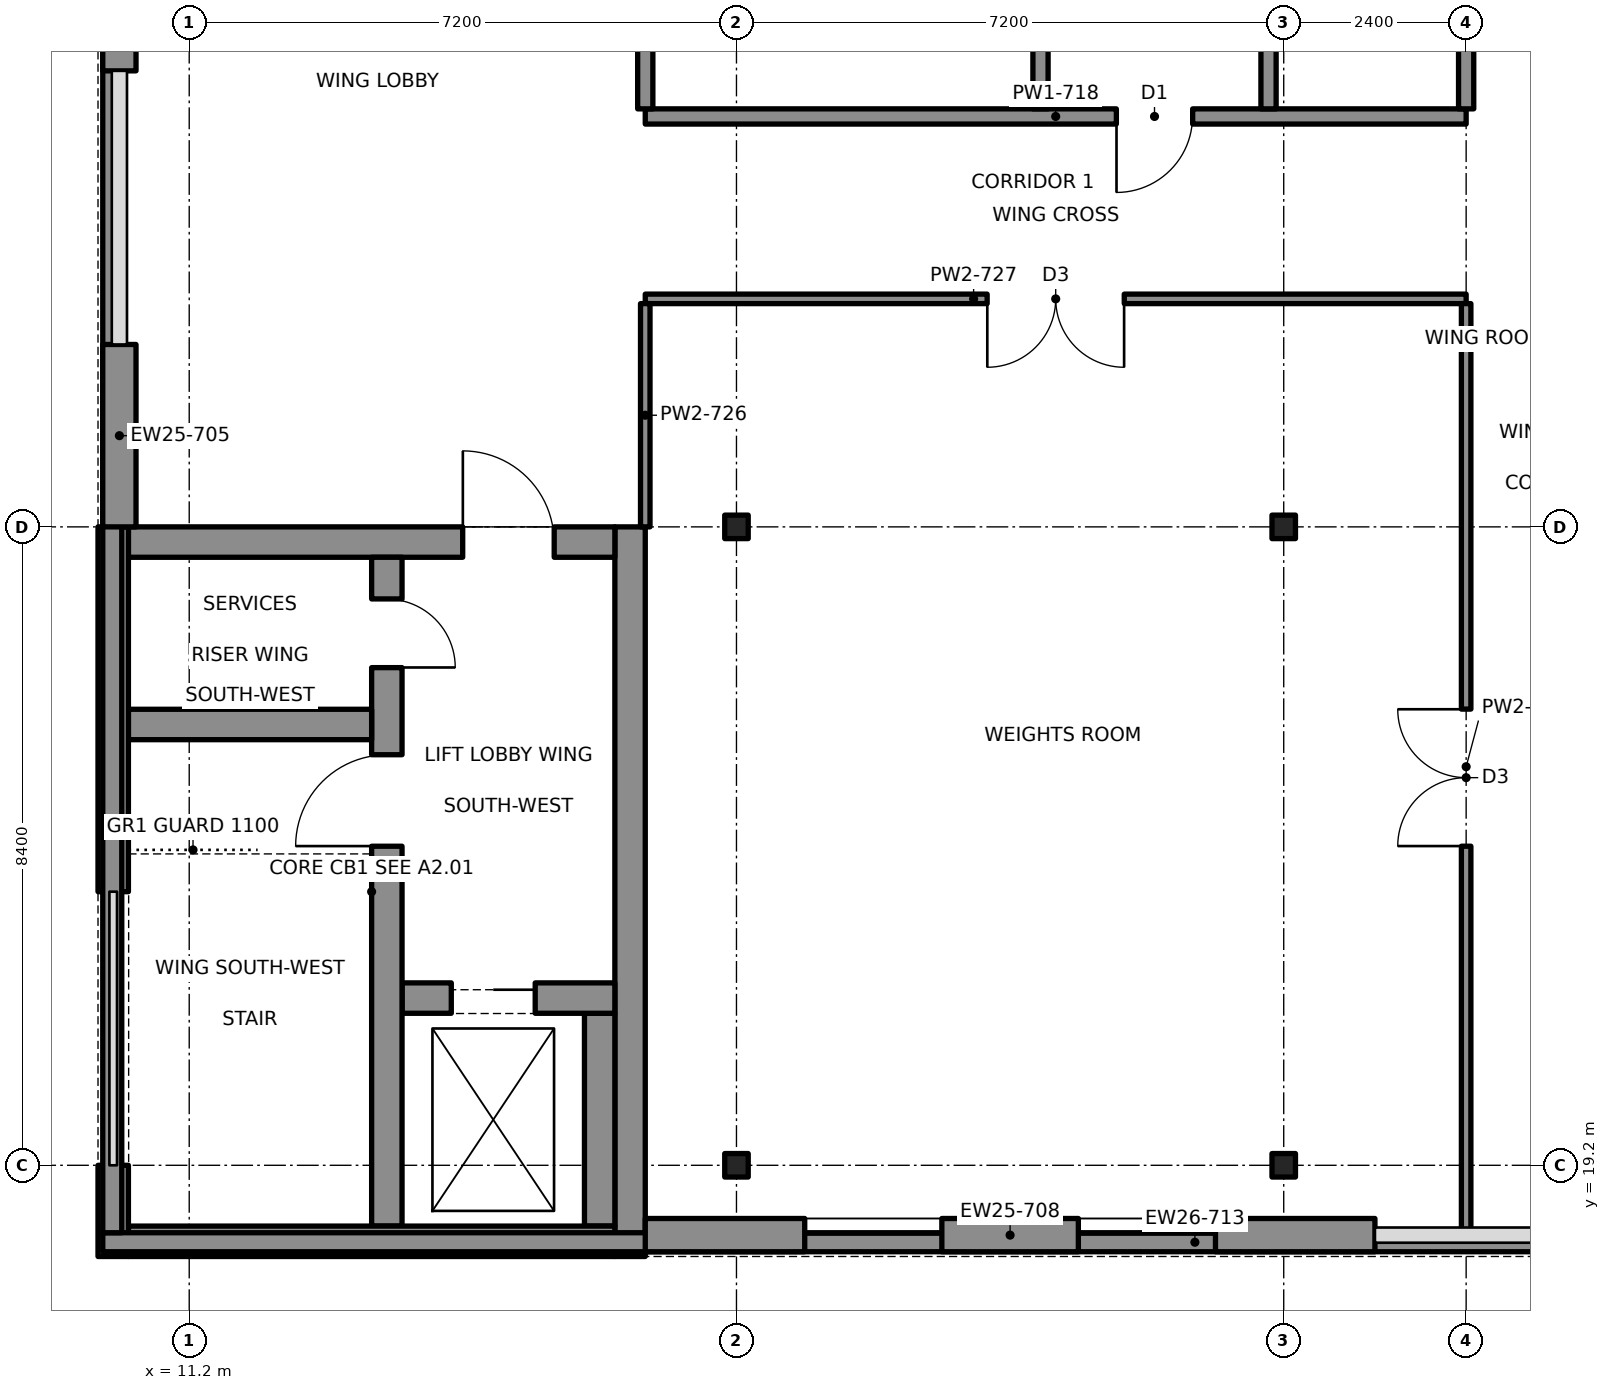
"""IFC4 building model, lengths in metres.
Left out: names, types, materials, properties, quantities, classifications, styles, units other than length and angle.
Written with IfcOpenShell. Run it as: python <this file> out.ifc"""

import sys

from ifc_helpers import new_model, si_unit, direction, frame, frame_2d, origin, origin_2d, place, context, subcontext, project, spatial, rectangle, i_section, extrude, element, fill, save


model = new_model("IFC4")
c1 = context("Model", 3, precision=1e-05, world=origin(), true_north=direction((0.0, 1.0)))
c2 = subcontext(c1, "Body", "Model", "MODEL_VIEW")
j1 = project(units=[si_unit("LENGTHUNIT", "METRE"), si_unit("PLANEANGLEUNIT", "RADIAN")], contexts=[c1])
p1 = place(None, origin())
s1 = spatial("IfcSite", under=j1, at=p1, CompositionType="ELEMENT")
p2 = place(p1, origin())
s2 = spatial("IfcBuilding", under=s1, at=p2, CompositionType="ELEMENT")
p3 = place(p2, frame((0.0, 0.0, 14.0)))
s3 = spatial("IfcBuildingStorey", under=s2, at=p3, CompositionType="ELEMENT", Elevation=14.0)
for number, where, z_axis, x_axis in (
    (1, (18.4, 19.2, 0.0), (0.0, 0.0, 1.0), (1.0, 0.0, 0.0)),
    (2, (18.4, 27.6, 0.0), (0.0, 0.0, 1.0), (1.0, 0.0, 0.0)),
    (3, (25.6, 19.2, 0.0), (0.0, 0.0, 1.0), (1.0, 0.0, 0.0)),
    (4, (25.6, 27.6, 0.0), (0.0, 0.0, 1.0), (1.0, 0.0, 0.0)),
):
    element("IfcColumn", number, at=place(p3, frame(where, z_axis=z_axis, x_axis=x_axis)), inside=s3, PredefinedType="COLUMN", context=c2, shape_type="SweptSolid", body=[
        extrude(i_section(OverallWidth=0.309, OverallDepth=0.323, WebThickness=0.014, FlangeThickness=0.023, at=origin_2d()), origin(), (0.0, 0.0, 1.0), 4.4),
    ])
p4 = place(p3, frame((17.2, 18.281, 0.0), z_axis=(0.0, 0.0, 1.0), x_axis=(1.0, 0.0, 0.0)))
e5 = element("IfcWall", 5, at=p4, inside=s3, PredefinedType="SOLIDWALL", context=c2, shape_type="SweptSolid", body=[
    extrude(rectangle(XDim=9.6, YDim=0.438, at=frame_2d((4.8, 0.0))), origin(), (0.0, 0.0, 1.0), 4.4),
])
p5 = place(p4, frame((2.1, 0.0, 0.75)))
e6 = element("IfcOpeningElement", 6, at=p5, cuts=e5, PredefinedType="OPENING", context=c2, shape_type="SweptSolid", body=[
    extrude(rectangle(XDim=1.8, YDim=2.8, at=frame_2d((0.9, 1.4))), frame((0.0, 0.229, 0.0), z_axis=(0.0, -1.0, 0.0), x_axis=(1.0, 0.0, 0.0)), (0.0, 0.0, 1.0), 0.458),
])
p6 = place(p4, frame((5.7, 0.0, 0.75)))
e7 = element("IfcOpeningElement", 7, at=p6, cuts=e5, PredefinedType="OPENING", context=c2, shape_type="SweptSolid", body=[
    extrude(rectangle(XDim=1.8, YDim=2.8, at=frame_2d((0.9, 1.4))), frame((0.0, 0.229, 0.0), z_axis=(0.0, -1.0, 0.0), x_axis=(1.0, 0.0, 0.0)), (0.0, 0.0, 1.0), 0.458),
])
p7 = place(p3, frame((10.281, 27.6, 0.0), z_axis=(0.0, 0.0, 1.0), x_axis=(0.0, 1.0, 0.0)))
e8 = element("IfcWall", 8, at=p7, inside=s3, PredefinedType="SOLIDWALL", context=c2, shape_type="SweptSolid", body=[
    extrude(rectangle(XDim=2.4, YDim=0.438, at=frame_2d((1.2, 0.0))), origin(), (0.0, 0.0, 1.0), 4.4),
])
p8 = place(p3, frame((10.281, 33.6, 0.0), z_axis=(0.0, 0.0, 1.0), x_axis=(0.0, 1.0, 0.0)))
e9 = element("IfcWall", 9, at=p8, inside=s3, PredefinedType="SOLIDWALL", context=c2, shape_type="SweptSolid", body=[
    extrude(rectangle(XDim=4.8, YDim=0.438, at=frame_2d((2.4, 0.0))), origin(), (0.0, 0.0, 1.0), 4.4),
])
p9 = place(p3, frame((10.062, 18.188, 4.4), z_axis=(0.0, 0.0, 1.0), x_axis=(1.0, 0.0, 0.0)))
e10 = element("IfcWall", 10, at=p9, inside=s3, PredefinedType="PARAPET", context=c2, shape_type="SweptSolid", body=[
    extrude(rectangle(XDim=28.738, YDim=0.25, at=frame_2d((14.369, 0.0))), origin(), (0.0, 0.0, 1.0), 1.1),
])
p10 = place(p3, frame((10.188, 18.312, 4.4), z_axis=(0.0, 0.0, 1.0), x_axis=(0.0, 1.0, 0.0)))
e11 = element("IfcWall", 11, at=p10, inside=s3, PredefinedType="PARAPET", context=c2, shape_type="SweptSolid", body=[
    extrude(rectangle(XDim=35.375, YDim=0.25, at=frame_2d((17.688, 0.0))), origin(), (0.0, 0.0, 1.0), 1.1),
])
p11 = place(p3, frame((10.2, 18.0, 0.0), z_axis=(0.0, 0.0, 1.0), x_axis=(0.0, 1.0, 0.0)))
e12 = element("IfcWall", 12, at=p11, inside=s3, PredefinedType="SHEAR", context=c2, shape_type="SweptSolid", body=[
    extrude(rectangle(XDim=1.2, YDim=0.4, at=frame_2d((0.6, 0.0))), origin(), (0.0, 0.0, 1.0), 4.2),
])
p12 = place(p3, frame((10.2, 22.8, 0.0), z_axis=(0.0, 0.0, 1.0), x_axis=(0.0, 1.0, 0.0)))
e13 = element("IfcWall", 13, at=p12, inside=s3, PredefinedType="SHEAR", context=c2, shape_type="SweptSolid", body=[
    extrude(rectangle(XDim=4.8, YDim=0.4, at=frame_2d((2.4, 0.0))), origin(), (0.0, 0.0, 1.0), 4.2),
])
p13 = place(p3, frame((17.0, 18.0, 0.0), z_axis=(0.0, 0.0, 1.0), x_axis=(0.0, 1.0, 0.0)))
e14 = element("IfcWall", 14, at=p13, inside=s3, PredefinedType="SHEAR", context=c2, shape_type="SweptSolid", body=[
    extrude(rectangle(XDim=9.6, YDim=0.4, at=frame_2d((4.8, 0.0))), origin(), (0.0, 0.0, 1.0), 4.2),
])
p14 = place(p3, frame((10.4, 18.2, 0.0), z_axis=(0.0, 0.0, 1.0), x_axis=(1.0, 0.0, 0.0)))
e15 = element("IfcWall", 15, at=p14, inside=s3, PredefinedType="SHEAR", context=c2, shape_type="SweptSolid", body=[
    extrude(rectangle(XDim=6.4, YDim=0.4, at=frame_2d((3.2, 0.0))), origin(), (0.0, 0.0, 1.0), 4.2),
])
p15 = place(p3, frame((10.4, 27.4, 0.0), z_axis=(0.0, 0.0, 1.0), x_axis=(1.0, 0.0, 0.0)))
e16 = element("IfcWall", 16, at=p15, inside=s3, PredefinedType="SHEAR", context=c2, shape_type="SweptSolid", body=[
    extrude(rectangle(XDim=6.4, YDim=0.4, at=frame_2d((3.2, 0.0))), origin(), (0.0, 0.0, 1.0), 4.2),
])
p16 = place(p15, frame((4.4, 0.0, 0.0)))
e17 = element("IfcOpeningElement", 17, at=p16, cuts=e16, PredefinedType="OPENING", context=c2, shape_type="SweptSolid", body=[
    extrude(rectangle(XDim=1.2, YDim=2.1, at=frame_2d((0.6, 1.05))), frame((0.0, 0.21, 0.0), z_axis=(0.0, -1.0, 0.0), x_axis=(1.0, 0.0, 0.0)), (0.0, 0.0, 1.0), 0.42),
])
p17 = place(p3, frame((13.8, 18.4, 0.0), z_axis=(0.0, 0.0, 1.0), x_axis=(0.0, 1.0, 0.0)))
e18 = element("IfcWall", 18, at=p17, inside=s3, PredefinedType="SHEAR", context=c2, shape_type="SweptSolid", body=[
    extrude(rectangle(XDim=8.8, YDim=0.4, at=frame_2d((4.4, 0.0))), origin(), (0.0, 0.0, 1.0), 4.2),
])
p18 = place(p17, frame((5.0, 0.0, 0.0)))
e19 = element("IfcOpeningElement", 19, at=p18, cuts=e18, PredefinedType="OPENING", context=c2, shape_type="SweptSolid", body=[
    extrude(rectangle(XDim=1.2, YDim=2.1, at=frame_2d((0.6, 1.05))), frame((0.0, 0.21, 0.0), z_axis=(0.0, -1.0, 0.0), x_axis=(1.0, 0.0, 0.0)), (0.0, 0.0, 1.0), 0.42),
])
p19 = place(p17, frame((7.35, 0.0, 0.0)))
e20 = element("IfcOpeningElement", 20, at=p19, cuts=e18, PredefinedType="OPENING", context=c2, shape_type="SweptSolid", body=[
    extrude(rectangle(XDim=0.9, YDim=2.1, at=frame_2d((0.45, 1.05))), frame((0.0, 0.21, 0.0), z_axis=(0.0, -1.0, 0.0), x_axis=(1.0, 0.0, 0.0)), (0.0, 0.0, 1.0), 0.42),
])
p20 = place(p3, frame((10.4, 25.0, 0.0), z_axis=(0.0, 0.0, 1.0), x_axis=(1.0, 0.0, 0.0)))
e21 = element("IfcWall", 21, at=p20, inside=s3, PredefinedType="SHEAR", context=c2, shape_type="SweptSolid", body=[
    extrude(rectangle(XDim=3.2, YDim=0.4, at=frame_2d((1.6, 0.0))), origin(), (0.0, 0.0, 1.0), 4.2),
])
p21 = place(p3, frame((14.0, 21.4, 0.0), z_axis=(0.0, 0.0, 1.0), x_axis=(1.0, 0.0, 0.0)))
e22 = element("IfcWall", 22, at=p21, inside=s3, PredefinedType="SHEAR", context=c2, shape_type="SweptSolid", body=[
    extrude(rectangle(XDim=2.8, YDim=0.4, at=frame_2d((1.4, 0.0))), origin(), (0.0, 0.0, 1.0), 4.2),
])
p22 = place(p21, frame((0.65, 0.0, 0.0)))
e23 = element("IfcOpeningElement", 23, at=p22, cuts=e22, PredefinedType="OPENING", context=c2, shape_type="SweptSolid", body=[
    extrude(rectangle(XDim=1.1, YDim=2.1, at=frame_2d((0.55, 1.05))), frame((0.0, 0.21, 0.0), z_axis=(0.0, -1.0, 0.0), x_axis=(1.0, 0.0, 0.0)), (0.0, 0.0, 1.0), 0.42),
])
p23 = place(p3, frame((16.6, 18.4, 0.0), z_axis=(0.0, 0.0, 1.0), x_axis=(0.0, 1.0, 0.0)))
e24 = element("IfcWall", 24, at=p23, inside=s3, PredefinedType="SHEAR", context=c2, shape_type="SweptSolid", body=[
    extrude(rectangle(XDim=2.8, YDim=0.4, at=frame_2d((1.4, 0.0))), origin(), (0.0, 0.0, 1.0), 4.2),
])
p24 = place(p3, frame((17.2, 30.6, 0.0), z_axis=(0.0, 0.0, 1.0), x_axis=(1.0, 0.0, 0.0)))
e25 = element("IfcWall", 25, at=p24, inside=s3, PredefinedType="PARTITIONING", context=c2, shape_type="SweptSolid", body=[
    extrude(rectangle(XDim=10.8, YDim=0.125, at=frame_2d((5.4, 0.0))), origin(), (0.0, 0.0, 1.0), 3.65),
])
p25 = place(p24, frame((4.5, 0.0, 0.0)))
e26 = element("IfcOpeningElement", 26, at=p25, cuts=e25, PredefinedType="OPENING", context=c2, shape_type="SweptSolid", body=[
    extrude(rectangle(XDim=1.8, YDim=2.1, at=frame_2d((0.9, 1.05))), frame((0.0, 0.073, 0.0), z_axis=(0.0, -1.0, 0.0), x_axis=(1.0, 0.0, 0.0)), (0.0, 0.0, 1.0), 0.145),
])
p26 = place(p3, frame((17.2, 33.0, 0.0), z_axis=(0.0, 0.0, 1.0), x_axis=(1.0, 0.0, 0.0)))
e27 = element("IfcWall", 27, at=p26, inside=s3, PredefinedType="PARTITIONING", context=c2, shape_type="SweptSolid", body=[
    extrude(rectangle(XDim=10.8, YDim=0.2, at=frame_2d((5.4, 0.0))), origin(), (0.0, 0.0, 1.0), 3.65),
])
p27 = place(p26, frame((6.2, 0.0, 0.0)))
e28 = element("IfcOpeningElement", 28, at=p27, cuts=e27, PredefinedType="OPENING", context=c2, shape_type="SweptSolid", body=[
    extrude(rectangle(XDim=1.0, YDim=2.1, at=frame_2d((0.5, 1.05))), frame((0.0, 0.11, 0.0), z_axis=(0.0, -1.0, 0.0), x_axis=(1.0, 0.0, 0.0)), (0.0, 0.0, 1.0), 0.22),
])
p28 = place(p3, frame((17.2, 27.6, 0.0), z_axis=(0.0, 0.0, 1.0), x_axis=(0.0, 1.0, 0.0)))
e29 = element("IfcWall", 29, at=p28, inside=s3, PredefinedType="PARTITIONING", context=c2, shape_type="SweptSolid", body=[
    extrude(rectangle(XDim=2.938, YDim=0.125, at=frame_2d((1.469, 0.0))), origin(), (0.0, 0.0, 1.0), 3.65),
])
p29 = place(p3, frame((17.2, 33.1, 0.0), z_axis=(0.0, 0.0, 1.0), x_axis=(0.0, 1.0, 0.0)))
e30 = element("IfcWall", 30, at=p29, inside=s3, PredefinedType="PARTITIONING", context=c2, shape_type="SweptSolid", body=[
    extrude(rectangle(XDim=5.8, YDim=0.2, at=frame_2d((2.9, 0.0))), origin(), (0.0, 0.0, 1.0), 3.65),
])
p30 = place(p29, frame((3.4, 0.0, 0.0)))
e31 = element("IfcOpeningElement", 31, at=p30, cuts=e30, PredefinedType="OPENING", context=c2, shape_type="SweptSolid", body=[
    extrude(rectangle(XDim=1.0, YDim=2.1, at=frame_2d((0.5, 1.05))), frame((0.0, 0.11, 0.0), z_axis=(0.0, -1.0, 0.0), x_axis=(1.0, 0.0, 0.0)), (0.0, 0.0, 1.0), 0.22),
])
for number, where, z_axis, x_axis in (
    (32, (22.4, 33.1, 0.0), (0.0, 0.0, 1.0), (0.0, 1.0, 0.0)),
    (33, (25.4, 33.1, 0.0), (0.0, 0.0, 1.0), (0.0, 1.0, 0.0)),
):
    element("IfcWall", number, at=place(p3, frame(where, z_axis=z_axis, x_axis=x_axis)), inside=s3, PredefinedType="PARTITIONING", context=c2, shape_type="SweptSolid", body=[
        extrude(rectangle(XDim=5.8, YDim=0.2, at=frame_2d((2.9, 0.0))), origin(), (0.0, 0.0, 1.0), 3.65),
    ])
p31 = place(p3, frame((28.0, 18.351, 0.0), z_axis=(0.0, 0.0, 1.0), x_axis=(0.0, 1.0, 0.0)))
e34 = element("IfcWall", 34, at=p31, inside=s3, PredefinedType="PARTITIONING", context=c2, shape_type="SweptSolid", body=[
    extrude(rectangle(XDim=12.186, YDim=0.125, at=frame_2d((6.093, 0.0))), origin(), (0.0, 0.0, 1.0), 3.65),
])
p32 = place(p31, frame((5.049, 0.0, 0.0)))
e35 = element("IfcOpeningElement", 35, at=p32, cuts=e34, PredefinedType="OPENING", context=c2, shape_type="SweptSolid", body=[
    extrude(rectangle(XDim=1.8, YDim=2.1, at=frame_2d((0.9, 1.05))), frame((0.0, 0.073, 0.0), z_axis=(0.0, -1.0, 0.0), x_axis=(1.0, 0.0, 0.0)), (0.0, 0.0, 1.0), 0.145),
])
p33 = place(p3, frame((28.0, 33.1, 0.0), z_axis=(0.0, 0.0, 1.0), x_axis=(0.0, 1.0, 0.0)))
e36 = element("IfcWall", 36, at=p33, inside=s3, PredefinedType="PARTITIONING", context=c2, shape_type="SweptSolid", body=[
    extrude(rectangle(XDim=5.8, YDim=0.2, at=frame_2d((2.9, 0.0))), origin(), (0.0, 0.0, 1.0), 3.65),
])
p34 = place(p33, frame((3.4, 0.0, 0.0)))
e37 = element("IfcOpeningElement", 37, at=p34, cuts=e36, PredefinedType="OPENING", context=c2, shape_type="SweptSolid", body=[
    extrude(rectangle(XDim=1.0, YDim=2.1, at=frame_2d((0.5, 1.05))), frame((0.0, 0.11, 0.0), z_axis=(0.0, -1.0, 0.0), x_axis=(1.0, 0.0, 0.0)), (0.0, 0.0, 1.0), 0.22),
])
p35 = place(p5, origin())
e38 = element("IfcWindow", 38, at=p35, inside=s3, PartitioningType="SINGLE_PANEL", PredefinedType="WINDOW", context=c2, shape_type="SweptSolid", body=[
    extrude(rectangle(XDim=1.8, YDim=2.8, at=frame_2d((0.9, 1.4))), frame((0.0, 0.03, 0.0), z_axis=(0.0, -1.0, 0.0), x_axis=(1.0, 0.0, 0.0)), (0.0, 0.0, 1.0), 0.06),
])
fill(e6, e38)
p36 = place(p6, origin())
e39 = element("IfcWindow", 39, at=p36, inside=s3, PartitioningType="SINGLE_PANEL", PredefinedType="WINDOW", context=c2, shape_type="SweptSolid", body=[
    extrude(rectangle(XDim=1.8, YDim=2.8, at=frame_2d((0.9, 1.4))), frame((0.0, 0.03, 0.0), z_axis=(0.0, -1.0, 0.0), x_axis=(1.0, 0.0, 0.0)), (0.0, 0.0, 1.0), 0.06),
])
fill(e7, e39)
p37 = place(p16, origin())
e40 = element("IfcDoor", 40, at=p37, inside=s3, OperationType="SINGLE_SWING_LEFT", PredefinedType="DOOR", context=c2, shape_type="SweptSolid", body=[
    extrude(rectangle(XDim=1.2, YDim=2.1, at=frame_2d((0.6, 1.05))), frame((0.0, 0.025, 0.0), z_axis=(0.0, -1.0, 0.0), x_axis=(1.0, 0.0, 0.0)), (0.0, 0.0, 1.0), 0.05),
])
fill(e17, e40)
p38 = place(p18, origin())
e41 = element("IfcDoor", 41, at=p38, inside=s3, OperationType="SINGLE_SWING_LEFT", PredefinedType="DOOR", context=c2, shape_type="SweptSolid", body=[
    extrude(rectangle(XDim=1.2, YDim=2.1, at=frame_2d((0.6, 1.05))), frame((0.0, 0.025, 0.0), z_axis=(0.0, -1.0, 0.0), x_axis=(1.0, 0.0, 0.0)), (0.0, 0.0, 1.0), 0.05),
])
fill(e19, e41)
p39 = place(p19, origin())
e42 = element("IfcDoor", 42, at=p39, inside=s3, OperationType="SINGLE_SWING_LEFT", PredefinedType="DOOR", context=c2, shape_type="SweptSolid", body=[
    extrude(rectangle(XDim=0.9, YDim=2.1, at=frame_2d((0.45, 1.05))), frame((0.0, 0.025, 0.0), z_axis=(0.0, -1.0, 0.0), x_axis=(1.0, 0.0, 0.0)), (0.0, 0.0, 1.0), 0.05),
])
fill(e20, e42)
p40 = place(p22, origin())
e43 = element("IfcDoor", 43, at=p40, inside=s3, OperationType="SLIDING_TO_LEFT", PredefinedType="DOOR", context=c2, shape_type="SweptSolid", body=[
    extrude(rectangle(XDim=1.1, YDim=2.1, at=frame_2d((0.55, 1.05))), frame((0.0, 0.025, 0.0), z_axis=(0.0, -1.0, 0.0), x_axis=(1.0, 0.0, 0.0)), (0.0, 0.0, 1.0), 0.05),
])
fill(e23, e43)
p41 = place(p32, origin())
e44 = element("IfcDoor", 44, at=p41, inside=s3, OperationType="DOUBLE_DOOR_SINGLE_SWING", PredefinedType="DOOR", context=c2, shape_type="SweptSolid", body=[
    extrude(rectangle(XDim=1.8, YDim=2.1, at=frame_2d((0.9, 1.05))), frame((0.0, 0.025, 0.0), z_axis=(0.0, -1.0, 0.0), x_axis=(1.0, 0.0, 0.0)), (0.0, 0.0, 1.0), 0.05),
])
fill(e35, e44)
p42 = place(p27, origin())
e45 = element("IfcDoor", 45, at=p42, inside=s3, OperationType="SINGLE_SWING_LEFT", PredefinedType="DOOR", context=c2, shape_type="SweptSolid", body=[
    extrude(rectangle(XDim=1.0, YDim=2.1, at=frame_2d((0.5, 1.05))), frame((0.0, 0.025, 0.0), z_axis=(0.0, -1.0, 0.0), x_axis=(1.0, 0.0, 0.0)), (0.0, 0.0, 1.0), 0.05),
])
fill(e28, e45)
p43 = place(p25, origin())
e46 = element("IfcDoor", 46, at=p43, inside=s3, OperationType="DOUBLE_DOOR_SINGLE_SWING", PredefinedType="DOOR", context=c2, shape_type="SweptSolid", body=[
    extrude(rectangle(XDim=1.8, YDim=2.1, at=frame_2d((0.9, 1.05))), frame((0.0, 0.025, 0.0), z_axis=(0.0, -1.0, 0.0), x_axis=(1.0, 0.0, 0.0)), (0.0, 0.0, 1.0), 0.05),
])
fill(e26, e46)
save(model, sys.argv[1])
